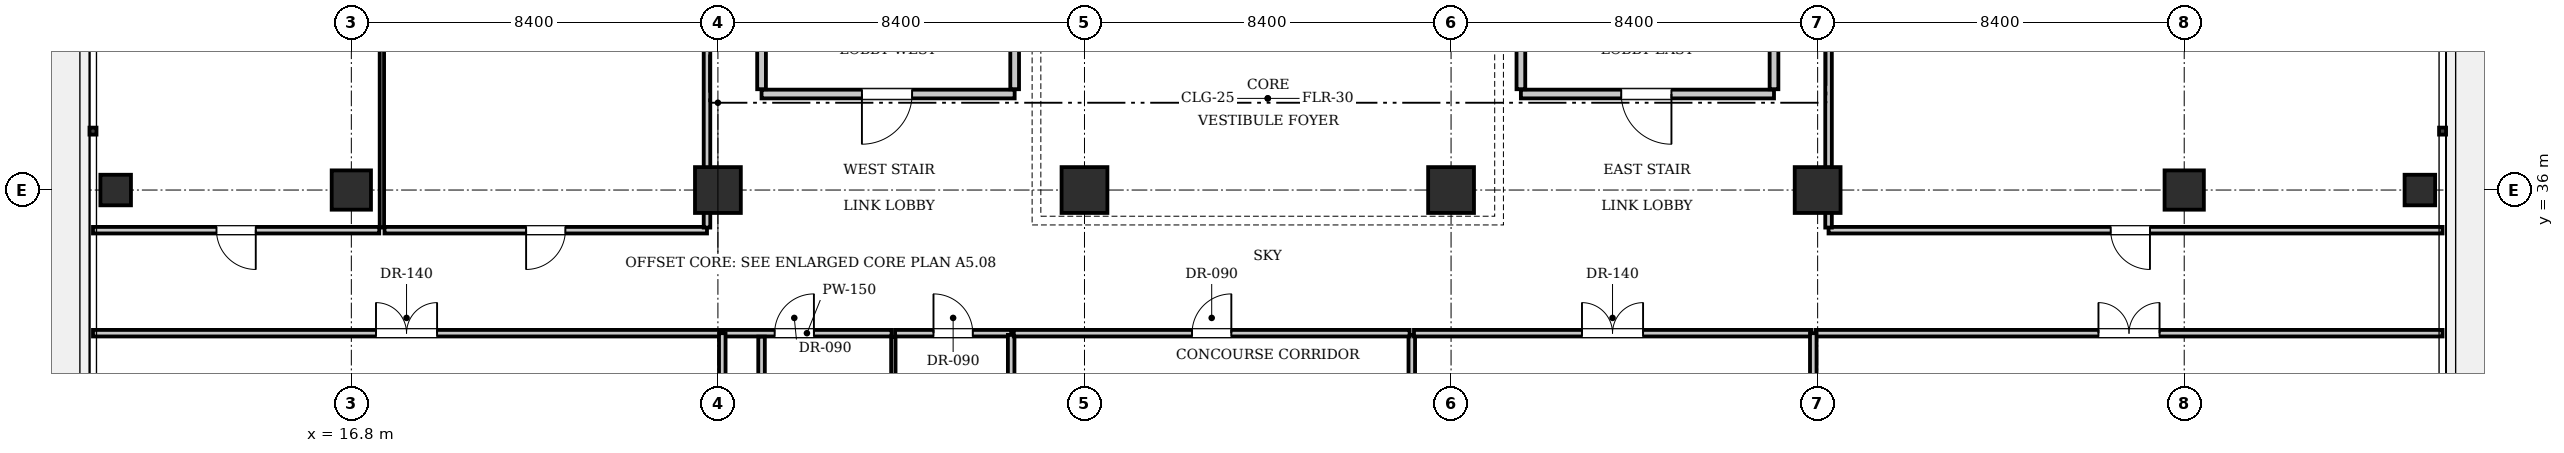
"""IFC4 building model, lengths in metres.
Left out: names, types, materials, properties, quantities, classifications, styles, units other than length and angle.
Written with IfcOpenShell. Run it as: python <this file> out.ifc"""

import sys

from ifc_helpers import new_model, si_unit, direction, frame, frame_2d, origin, origin_2d, place, context, subcontext, project, spatial, rectangle, i_section, extrude, element, fill, save


model = new_model("IFC4")
c1 = context("Model", 3, precision=1e-05, world=origin(), true_north=direction((0.0, 1.0)))
c2 = subcontext(c1, "Body", "Model", "MODEL_VIEW")
j1 = project(units=[si_unit("LENGTHUNIT", "METRE"), si_unit("PLANEANGLEUNIT", "RADIAN")], contexts=[c1])
p1 = place(None, origin())
s1 = spatial("IfcSite", under=j1, at=p1, CompositionType="ELEMENT")
p2 = place(p1, origin())
s2 = spatial("IfcBuilding", under=s1, at=p2, CompositionType="ELEMENT")
p3 = place(p2, frame((0.0, 0.0, 26.95)))
s3 = spatial("IfcBuildingStorey", under=s2, at=p3, CompositionType="ELEMENT", Elevation=26.95)
for number, where, z_axis, x_axis in (
    (1, (25.2, 36.0, 0.0), (0.0, 0.0, 1.0), (1.0, 0.0, 0.0)),
    (2, (33.6, 36.0, 0.0), (0.0, 0.0, 1.0), (1.0, 0.0, 0.0)),
    (3, (42.0, 36.0, 0.0), (0.0, 0.0, 1.0), (1.0, 0.0, 0.0)),
    (4, (50.4, 36.0, 0.0), (0.0, 0.0, 1.0), (1.0, 0.0, 0.0)),
):
    element("IfcColumn", number, at=place(p3, frame(where, z_axis=z_axis, x_axis=x_axis)), inside=s3, PredefinedType="COLUMN", context=c2, shape_type="SweptSolid", body=[
        extrude(rectangle(XDim=1.05, YDim=1.05, at=origin_2d()), origin(), (0.0, 0.0, 1.0), 3.85),
    ])
for number, where, z_axis, x_axis in (
    (5, (16.8, 36.0, 0.0), (0.0, 0.0, 1.0), (1.0, 0.0, 0.0)),
    (6, (58.8, 36.0, 0.0), (0.0, 0.0, 1.0), (1.0, 0.0, 0.0)),
):
    element("IfcColumn", number, at=place(p3, frame(where, z_axis=z_axis, x_axis=x_axis)), inside=s3, PredefinedType="COLUMN", context=c2, shape_type="SweptSolid", body=[
        extrude(rectangle(XDim=0.9, YDim=0.9, at=origin_2d()), origin(), (0.0, 0.0, 1.0), 3.85),
    ])
for number, where, z_axis, x_axis in (
    (7, (11.4, 36.0, -0.24), (0.0, 0.0, 1.0), (1.0, 0.0, 0.0)),
    (8, (64.2, 36.0, -0.24), (0.0, 0.0, 1.0), (1.0, 0.0, 0.0)),
):
    element("IfcColumn", number, at=place(p3, frame(where, z_axis=z_axis, x_axis=x_axis)), inside=s3, PredefinedType="COLUMN", context=c2, shape_type="SweptSolid", body=[
        extrude(i_section(OverallWidth=0.7, OverallDepth=0.7, WebThickness=0.028, FlangeThickness=0.044, at=origin_2d()), origin(), (0.0, 0.0, 1.0), 4.09),
    ])
p4 = place(p3, frame((26.2, 38.2, 0.0), z_axis=(0.0, 0.0, 1.0), x_axis=(1.0, 0.0, 0.0)))
e9 = element("IfcWall", 9, at=p4, inside=s3, PredefinedType="PARTITIONING", context=c2, shape_type="SweptSolid", body=[
    extrude(rectangle(XDim=5.8, YDim=0.2, at=frame_2d((2.9, 0.0))), origin(), (0.0, 0.0, 1.0), 3.61),
])
p5 = place(p4, frame((2.3, 0.0, 0.0)))
e10 = element("IfcOpeningElement", 10, at=p5, cuts=e9, PredefinedType="OPENING", context=c2, shape_type="SweptSolid", body=[
    extrude(rectangle(XDim=1.15, YDim=2.15, at=frame_2d((0.575, 1.075))), frame((0.0, 0.11, 0.0), z_axis=(0.0, -1.0, 0.0), x_axis=(1.0, 0.0, 0.0)), (0.0, 0.0, 1.0), 0.22),
])
for number, where, z_axis, x_axis in (
    (11, (26.2, 38.31, 0.0), (0.0, 0.0, 1.0), (0.0, 1.0, 0.0)),
    (12, (32.0, 38.31, 0.0), (0.0, 0.0, 1.0), (0.0, 1.0, 0.0)),
):
    element("IfcWall", number, at=place(p3, frame(where, z_axis=z_axis, x_axis=x_axis)), inside=s3, PredefinedType="PARTITIONING", context=c2, shape_type="SweptSolid", body=[
        extrude(rectangle(XDim=3.07, YDim=0.2, at=frame_2d((1.535, 0.0))), origin(), (0.0, 0.0, 1.0), 3.61),
    ])
p6 = place(p3, frame((43.6, 38.2, 0.0), z_axis=(0.0, 0.0, 1.0), x_axis=(1.0, 0.0, 0.0)))
e13 = element("IfcWall", 13, at=p6, inside=s3, PredefinedType="PARTITIONING", context=c2, shape_type="SweptSolid", body=[
    extrude(rectangle(XDim=5.8, YDim=0.2, at=frame_2d((2.9, 0.0))), origin(), (0.0, 0.0, 1.0), 3.61),
])
p7 = place(p6, frame((2.3, 0.0, 0.0)))
e14 = element("IfcOpeningElement", 14, at=p7, cuts=e13, PredefinedType="OPENING", context=c2, shape_type="SweptSolid", body=[
    extrude(rectangle(XDim=1.15, YDim=2.15, at=frame_2d((0.575, 1.075))), frame((0.0, 0.11, 0.0), z_axis=(0.0, -1.0, 0.0), x_axis=(1.0, 0.0, 0.0)), (0.0, 0.0, 1.0), 0.22),
])
for number, where, z_axis, x_axis in (
    (15, (43.6, 38.31, 0.0), (0.0, 0.0, 1.0), (0.0, 1.0, 0.0)),
    (16, (49.4, 38.31, 0.0), (0.0, 0.0, 1.0), (0.0, 1.0, 0.0)),
):
    element("IfcWall", number, at=place(p3, frame(where, z_axis=z_axis, x_axis=x_axis)), inside=s3, PredefinedType="PARTITIONING", context=c2, shape_type="SweptSolid", body=[
        extrude(rectangle(XDim=3.07, YDim=0.2, at=frame_2d((1.535, 0.0))), origin(), (0.0, 0.0, 1.0), 3.61),
    ])
p8 = place(p3, frame((25.3, 32.72, 0.0), z_axis=(0.0, 0.0, 1.0), x_axis=(1.0, 0.0, 0.0)))
e17 = element("IfcWall", 17, at=p8, inside=s3, PredefinedType="PARTITIONING", context=c2, shape_type="SweptSolid", body=[
    extrude(rectangle(XDim=3.88, YDim=0.15, at=frame_2d((1.94, 0.0))), origin(), (0.0, 0.0, 1.0), 3.61),
])
p9 = place(p8, frame((1.2, 0.0, 0.0)))
e18 = element("IfcOpeningElement", 18, at=p9, cuts=e17, PredefinedType="OPENING", context=c2, shape_type="SweptSolid", body=[
    extrude(rectangle(XDim=0.9, YDim=2.1, at=frame_2d((0.45, 1.05))), frame((0.0, 0.085, 0.0), z_axis=(0.0, -1.0, 0.0), x_axis=(1.0, 0.0, 0.0)), (0.0, 0.0, 1.0), 0.17),
])
p10 = place(p3, frame((29.26, 32.72, 0.0), z_axis=(0.0, 0.0, 1.0), x_axis=(1.0, 0.0, 0.0)))
e19 = element("IfcWall", 19, at=p10, inside=s3, PredefinedType="PARTITIONING", context=c2, shape_type="SweptSolid", body=[
    extrude(rectangle(XDim=2.66, YDim=0.15, at=frame_2d((1.33, 0.0))), origin(), (0.0, 0.0, 1.0), 3.61),
])
p11 = place(p10, frame((0.88, 0.0, 0.0)))
e20 = element("IfcOpeningElement", 20, at=p11, cuts=e19, PredefinedType="OPENING", context=c2, shape_type="SweptSolid", body=[
    extrude(rectangle(XDim=0.9, YDim=2.1, at=frame_2d((0.45, 1.05))), frame((0.0, 0.085, 0.0), z_axis=(0.0, -1.0, 0.0), x_axis=(1.0, 0.0, 0.0)), (0.0, 0.0, 1.0), 0.17),
])
p12 = place(p3, frame((26.2, 29.46, 0.0), z_axis=(0.0, 0.0, 1.0), x_axis=(0.0, 1.0, 0.0)))
e21 = element("IfcWall", 21, at=p12, inside=s3, PredefinedType="PARTITIONING", context=c2, shape_type="SweptSolid", body=[
    extrude(rectangle(XDim=3.18, YDim=0.15, at=frame_2d((1.59, 0.0))), origin(), (0.0, 0.0, 1.0), 3.61),
])
p13 = place(p3, frame((29.22, 29.46, 0.0), z_axis=(0.0, 0.0, 1.0), x_axis=(0.0, 1.0, 0.0)))
e22 = element("IfcWall", 22, at=p13, inside=s3, PredefinedType="PARTITIONING", context=c2, shape_type="SweptSolid", body=[
    extrude(rectangle(XDim=3.18, YDim=0.1, at=frame_2d((1.59, 0.0))), origin(), (0.0, 0.0, 1.0), 3.61),
])
p14 = place(p3, frame((31.92, 29.46, 0.0), z_axis=(0.0, 0.0, 1.0), x_axis=(0.0, 1.0, 0.0)))
e23 = element("IfcWall", 23, at=p14, inside=s3, PredefinedType="PARTITIONING", context=c2, shape_type="SweptSolid", body=[
    extrude(rectangle(XDim=3.22, YDim=0.15, at=frame_2d((1.61, 0.0))), origin(), (0.0, 0.0, 1.0), 3.61),
])
p15 = place(p3, frame((41.1, 18.38, 0.0), z_axis=(0.0, 0.0, 1.0), x_axis=(0.0, 1.0, 0.0)))
e24 = element("IfcWall", 24, at=p15, inside=s3, PredefinedType="PARTITIONING", context=c2, shape_type="SweptSolid", body=[
    extrude(rectangle(XDim=14.3, YDim=0.15, at=frame_2d((7.15, 0.0))), origin(), (0.0, 0.0, 1.0), 3.61),
])
p16 = place(p3, frame((10.88, 32.72, 0.0), z_axis=(0.0, 0.0, 1.0), x_axis=(1.0, 0.0, 0.0)))
e25 = element("IfcWall", 25, at=p16, inside=s3, PredefinedType="PARTITIONING", context=c2, shape_type="SweptSolid", body=[
    extrude(rectangle(XDim=14.37, YDim=0.15, at=frame_2d((7.185, 0.0))), origin(), (0.0, 0.0, 1.0), 3.61),
])
p17 = place(p16, frame((6.485, 0.0, 0.0)))
e26 = element("IfcOpeningElement", 26, at=p17, cuts=e25, PredefinedType="OPENING", context=c2, shape_type="SweptSolid", body=[
    extrude(rectangle(XDim=1.4, YDim=2.2, at=frame_2d((0.7, 1.1))), frame((0.0, 0.085, 0.0), z_axis=(0.0, -1.0, 0.0), x_axis=(1.0, 0.0, 0.0)), (0.0, 0.0, 1.0), 0.17),
])
p18 = place(p3, frame((31.98, 32.72, 0.0), z_axis=(0.0, 0.0, 1.0), x_axis=(1.0, 0.0, 0.0)))
e27 = element("IfcWall", 27, at=p18, inside=s3, PredefinedType="PARTITIONING", context=c2, shape_type="SweptSolid", body=[
    extrude(rectangle(XDim=9.07, YDim=0.15, at=frame_2d((4.535, 0.0))), origin(), (0.0, 0.0, 1.0), 3.61),
])
p19 = place(p18, frame((4.085, 0.0, 0.0)))
e28 = element("IfcOpeningElement", 28, at=p19, cuts=e27, PredefinedType="OPENING", context=c2, shape_type="SweptSolid", body=[
    extrude(rectangle(XDim=0.9, YDim=2.1, at=frame_2d((0.45, 1.05))), frame((0.0, 0.085, 0.0), z_axis=(0.0, -1.0, 0.0), x_axis=(1.0, 0.0, 0.0)), (0.0, 0.0, 1.0), 0.17),
])
p20 = place(p3, frame((41.15, 32.72, 0.0), z_axis=(0.0, 0.0, 1.0), x_axis=(1.0, 0.0, 0.0)))
e29 = element("IfcWall", 29, at=p20, inside=s3, PredefinedType="PARTITIONING", context=c2, shape_type="SweptSolid", body=[
    extrude(rectangle(XDim=9.1, YDim=0.15, at=frame_2d((4.55, 0.0))), origin(), (0.0, 0.0, 1.0), 3.61),
])
p21 = place(p20, frame((3.85, 0.0, 0.0)))
e30 = element("IfcOpeningElement", 30, at=p21, cuts=e29, PredefinedType="OPENING", context=c2, shape_type="SweptSolid", body=[
    extrude(rectangle(XDim=1.4, YDim=2.2, at=frame_2d((0.7, 1.1))), frame((0.0, 0.085, 0.0), z_axis=(0.0, -1.0, 0.0), x_axis=(1.0, 0.0, 0.0)), (0.0, 0.0, 1.0), 0.17),
])
p22 = place(p3, frame((50.35, 32.72, 0.0), z_axis=(0.0, 0.0, 1.0), x_axis=(1.0, 0.0, 0.0)))
e31 = element("IfcWall", 31, at=p22, inside=s3, PredefinedType="PARTITIONING", context=c2, shape_type="SweptSolid", body=[
    extrude(rectangle(XDim=14.37, YDim=0.15, at=frame_2d((7.185, 0.0))), origin(), (0.0, 0.0, 1.0), 3.61),
])
p23 = place(p22, frame((6.485, 0.0, 0.0)))
e32 = element("IfcOpeningElement", 32, at=p23, cuts=e31, PredefinedType="OPENING", context=c2, shape_type="SweptSolid", body=[
    extrude(rectangle(XDim=1.4, YDim=2.2, at=frame_2d((0.7, 1.1))), frame((0.0, 0.085, 0.0), z_axis=(0.0, -1.0, 0.0), x_axis=(1.0, 0.0, 0.0)), (0.0, 0.0, 1.0), 0.17),
])
for number, where, z_axis, x_axis in (
    (33, (25.3, 0.08, 0.0), (0.0, 0.0, 1.0), (0.0, 1.0, 0.0)),
    (34, (50.3, 0.08, 0.0), (0.0, 0.0, 1.0), (0.0, 1.0, 0.0)),
):
    element("IfcWall", number, at=place(p3, frame(where, z_axis=z_axis, x_axis=x_axis)), inside=s3, PredefinedType="PARTITIONING", context=c2, shape_type="SweptSolid", body=[
        extrude(rectangle(XDim=32.64, YDim=0.15, at=frame_2d((16.32, 0.0))), origin(), (0.0, 0.0, 1.0), 2.975),
    ])
p24 = place(p3, frame((10.88, 35.08, 0.0), z_axis=(0.0, 0.0, 1.0), x_axis=(1.0, 0.0, 0.0)))
e35 = element("IfcWall", 35, at=p24, inside=s3, PredefinedType="PARTITIONING", context=c2, shape_type="SweptSolid", body=[
    extrude(rectangle(XDim=6.56, YDim=0.15, at=frame_2d((3.28, 0.0))), origin(), (0.0, 0.0, 1.0), 3.61),
])
p25 = place(p24, frame((2.83, 0.0, 0.0)))
e36 = element("IfcOpeningElement", 36, at=p25, cuts=e35, PredefinedType="OPENING", context=c2, shape_type="SweptSolid", body=[
    extrude(rectangle(XDim=0.9, YDim=2.1, at=frame_2d((0.45, 1.05))), frame((0.0, 0.085, 0.0), z_axis=(0.0, -1.0, 0.0), x_axis=(1.0, 0.0, 0.0)), (0.0, 0.0, 1.0), 0.17),
])
p26 = place(p3, frame((17.56, 35.08, 0.0), z_axis=(0.0, 0.0, 1.0), x_axis=(1.0, 0.0, 0.0)))
e37 = element("IfcWall", 37, at=p26, inside=s3, PredefinedType="PARTITIONING", context=c2, shape_type="SweptSolid", body=[
    extrude(rectangle(XDim=7.39, YDim=0.15, at=frame_2d((3.695, 0.0))), origin(), (0.0, 0.0, 1.0), 3.61),
])
p27 = place(p26, frame((3.245, 0.0, 0.0)))
e38 = element("IfcOpeningElement", 38, at=p27, cuts=e37, PredefinedType="OPENING", context=c2, shape_type="SweptSolid", body=[
    extrude(rectangle(XDim=0.9, YDim=2.1, at=frame_2d((0.45, 1.05))), frame((0.0, 0.085, 0.0), z_axis=(0.0, -1.0, 0.0), x_axis=(1.0, 0.0, 0.0)), (0.0, 0.0, 1.0), 0.17),
])
p28 = place(p3, frame((17.5, 35.14, 0.0), z_axis=(0.0, 0.0, 1.0), x_axis=(0.0, 1.0, 0.0)))
e39 = element("IfcWall", 39, at=p28, inside=s3, PredefinedType="PARTITIONING", context=c2, shape_type="SweptSolid", body=[
    extrude(rectangle(XDim=18.78, YDim=0.1, at=frame_2d((9.39, 0.0))), origin(), (0.0, 0.0, 1.0), 3.61),
])
p29 = place(p3, frame((24.95, 35.14, 0.0), z_axis=(0.0, 0.0, 1.0), x_axis=(0.0, 1.0, 0.0)))
e40 = element("IfcWall", 40, at=p29, inside=s3, PredefinedType="PARTITIONING", context=c2, shape_type="SweptSolid", body=[
    extrude(rectangle(XDim=18.78, YDim=0.15, at=frame_2d((9.39, 0.0))), origin(), (0.0, 0.0, 1.0), 3.61),
])
p30 = place(p3, frame((50.65, 35.08, 0.0), z_axis=(0.0, 0.0, 1.0), x_axis=(1.0, 0.0, 0.0)))
e41 = element("IfcWall", 41, at=p30, inside=s3, PredefinedType="PARTITIONING", context=c2, shape_type="SweptSolid", body=[
    extrude(rectangle(XDim=14.07, YDim=0.15, at=frame_2d((7.035, 0.0))), origin(), (0.0, 0.0, 1.0), 3.61),
])
p31 = place(p30, frame((6.465, 0.0, 0.0)))
e42 = element("IfcOpeningElement", 42, at=p31, cuts=e41, PredefinedType="OPENING", context=c2, shape_type="SweptSolid", body=[
    extrude(rectangle(XDim=0.9, YDim=2.1, at=frame_2d((0.45, 1.05))), frame((0.0, 0.085, 0.0), z_axis=(0.0, -1.0, 0.0), x_axis=(1.0, 0.0, 0.0)), (0.0, 0.0, 1.0), 0.17),
])
p32 = place(p3, frame((50.65, 35.14, 0.0), z_axis=(0.0, 0.0, 1.0), x_axis=(0.0, 1.0, 0.0)))
e43 = element("IfcWall", 43, at=p32, inside=s3, PredefinedType="PARTITIONING", context=c2, shape_type="SweptSolid", body=[
    extrude(rectangle(XDim=18.78, YDim=0.15, at=frame_2d((9.39, 0.0))), origin(), (0.0, 0.0, 1.0), 3.61),
])
p33 = place(p5, frame((1.15, 0.0, 0.0), z_axis=(0.0, 0.0, 1.0), x_axis=(-1.0, 0.0, 0.0)))
e44 = element("IfcDoor", 44, at=p33, inside=s3, OperationType="SINGLE_SWING_RIGHT", PredefinedType="DOOR", context=c2, shape_type="SweptSolid", body=[
    extrude(rectangle(XDim=1.15, YDim=2.15, at=frame_2d((0.575, 1.075))), frame((0.0, 0.025, 0.0), z_axis=(0.0, -1.0, 0.0), x_axis=(1.0, 0.0, 0.0)), (0.0, 0.0, 1.0), 0.05),
])
fill(e10, e44)
p34 = place(p7, frame((1.15, 0.0, 0.0), z_axis=(0.0, 0.0, 1.0), x_axis=(-1.0, 0.0, 0.0)))
e45 = element("IfcDoor", 45, at=p34, inside=s3, OperationType="SINGLE_SWING_LEFT", PredefinedType="DOOR", context=c2, shape_type="SweptSolid", body=[
    extrude(rectangle(XDim=1.15, YDim=2.15, at=frame_2d((0.575, 1.075))), frame((0.0, 0.025, 0.0), z_axis=(0.0, -1.0, 0.0), x_axis=(1.0, 0.0, 0.0)), (0.0, 0.0, 1.0), 0.05),
])
fill(e14, e45)
p35 = place(p9, origin())
e46 = element("IfcDoor", 46, at=p35, inside=s3, OperationType="SINGLE_SWING_RIGHT", PredefinedType="DOOR", context=c2, shape_type="SweptSolid", body=[
    extrude(rectangle(XDim=0.9, YDim=2.1, at=frame_2d((0.45, 1.05))), frame((0.0, 0.025, 0.0), z_axis=(0.0, -1.0, 0.0), x_axis=(1.0, 0.0, 0.0)), (0.0, 0.0, 1.0), 0.05),
])
fill(e18, e46)
p36 = place(p11, origin())
e47 = element("IfcDoor", 47, at=p36, inside=s3, OperationType="SINGLE_SWING_LEFT", PredefinedType="DOOR", context=c2, shape_type="SweptSolid", body=[
    extrude(rectangle(XDim=0.9, YDim=2.1, at=frame_2d((0.45, 1.05))), frame((0.0, 0.025, 0.0), z_axis=(0.0, -1.0, 0.0), x_axis=(1.0, 0.0, 0.0)), (0.0, 0.0, 1.0), 0.05),
])
fill(e20, e47)
p37 = place(p17, origin())
e48 = element("IfcDoor", 48, at=p37, inside=s3, OperationType="DOUBLE_DOOR_SINGLE_SWING", PredefinedType="DOOR", context=c2, shape_type="SweptSolid", body=[
    extrude(rectangle(XDim=1.4, YDim=2.2, at=frame_2d((0.7, 1.1))), frame((0.0, 0.025, 0.0), z_axis=(0.0, -1.0, 0.0), x_axis=(1.0, 0.0, 0.0)), (0.0, 0.0, 1.0), 0.05),
])
fill(e26, e48)
p38 = place(p19, origin())
e49 = element("IfcDoor", 49, at=p38, inside=s3, OperationType="SINGLE_SWING_RIGHT", PredefinedType="DOOR", context=c2, shape_type="SweptSolid", body=[
    extrude(rectangle(XDim=0.9, YDim=2.1, at=frame_2d((0.45, 1.05))), frame((0.0, 0.025, 0.0), z_axis=(0.0, -1.0, 0.0), x_axis=(1.0, 0.0, 0.0)), (0.0, 0.0, 1.0), 0.05),
])
fill(e28, e49)
p39 = place(p21, origin())
e50 = element("IfcDoor", 50, at=p39, inside=s3, OperationType="DOUBLE_DOOR_SINGLE_SWING", PredefinedType="DOOR", context=c2, shape_type="SweptSolid", body=[
    extrude(rectangle(XDim=1.4, YDim=2.2, at=frame_2d((0.7, 1.1))), frame((0.0, 0.025, 0.0), z_axis=(0.0, -1.0, 0.0), x_axis=(1.0, 0.0, 0.0)), (0.0, 0.0, 1.0), 0.05),
])
fill(e30, e50)
p40 = place(p23, origin())
e51 = element("IfcDoor", 51, at=p40, inside=s3, OperationType="DOUBLE_DOOR_SINGLE_SWING", PredefinedType="DOOR", context=c2, shape_type="SweptSolid", body=[
    extrude(rectangle(XDim=1.4, YDim=2.2, at=frame_2d((0.7, 1.1))), frame((0.0, 0.025, 0.0), z_axis=(0.0, -1.0, 0.0), x_axis=(1.0, 0.0, 0.0)), (0.0, 0.0, 1.0), 0.05),
])
fill(e32, e51)
p41 = place(p25, frame((0.9, 0.0, 0.0), z_axis=(0.0, 0.0, 1.0), x_axis=(-1.0, 0.0, 0.0)))
e52 = element("IfcDoor", 52, at=p41, inside=s3, OperationType="SINGLE_SWING_LEFT", PredefinedType="DOOR", context=c2, shape_type="SweptSolid", body=[
    extrude(rectangle(XDim=0.9, YDim=2.1, at=frame_2d((0.45, 1.05))), frame((0.0, 0.025, 0.0), z_axis=(0.0, -1.0, 0.0), x_axis=(1.0, 0.0, 0.0)), (0.0, 0.0, 1.0), 0.05),
])
fill(e36, e52)
p42 = place(p27, frame((0.9, 0.0, 0.0), z_axis=(0.0, 0.0, 1.0), x_axis=(-1.0, 0.0, 0.0)))
e53 = element("IfcDoor", 53, at=p42, inside=s3, OperationType="SINGLE_SWING_RIGHT", PredefinedType="DOOR", context=c2, shape_type="SweptSolid", body=[
    extrude(rectangle(XDim=0.9, YDim=2.1, at=frame_2d((0.45, 1.05))), frame((0.0, 0.025, 0.0), z_axis=(0.0, -1.0, 0.0), x_axis=(1.0, 0.0, 0.0)), (0.0, 0.0, 1.0), 0.05),
])
fill(e38, e53)
p43 = place(p31, frame((0.9, 0.0, 0.0), z_axis=(0.0, 0.0, 1.0), x_axis=(-1.0, 0.0, 0.0)))
e54 = element("IfcDoor", 54, at=p43, inside=s3, OperationType="SINGLE_SWING_LEFT", PredefinedType="DOOR", context=c2, shape_type="SweptSolid", body=[
    extrude(rectangle(XDim=0.9, YDim=2.1, at=frame_2d((0.45, 1.05))), frame((0.0, 0.025, 0.0), z_axis=(0.0, -1.0, 0.0), x_axis=(1.0, 0.0, 0.0)), (0.0, 0.0, 1.0), 0.05),
])
fill(e42, e54)
save(model, sys.argv[1])
